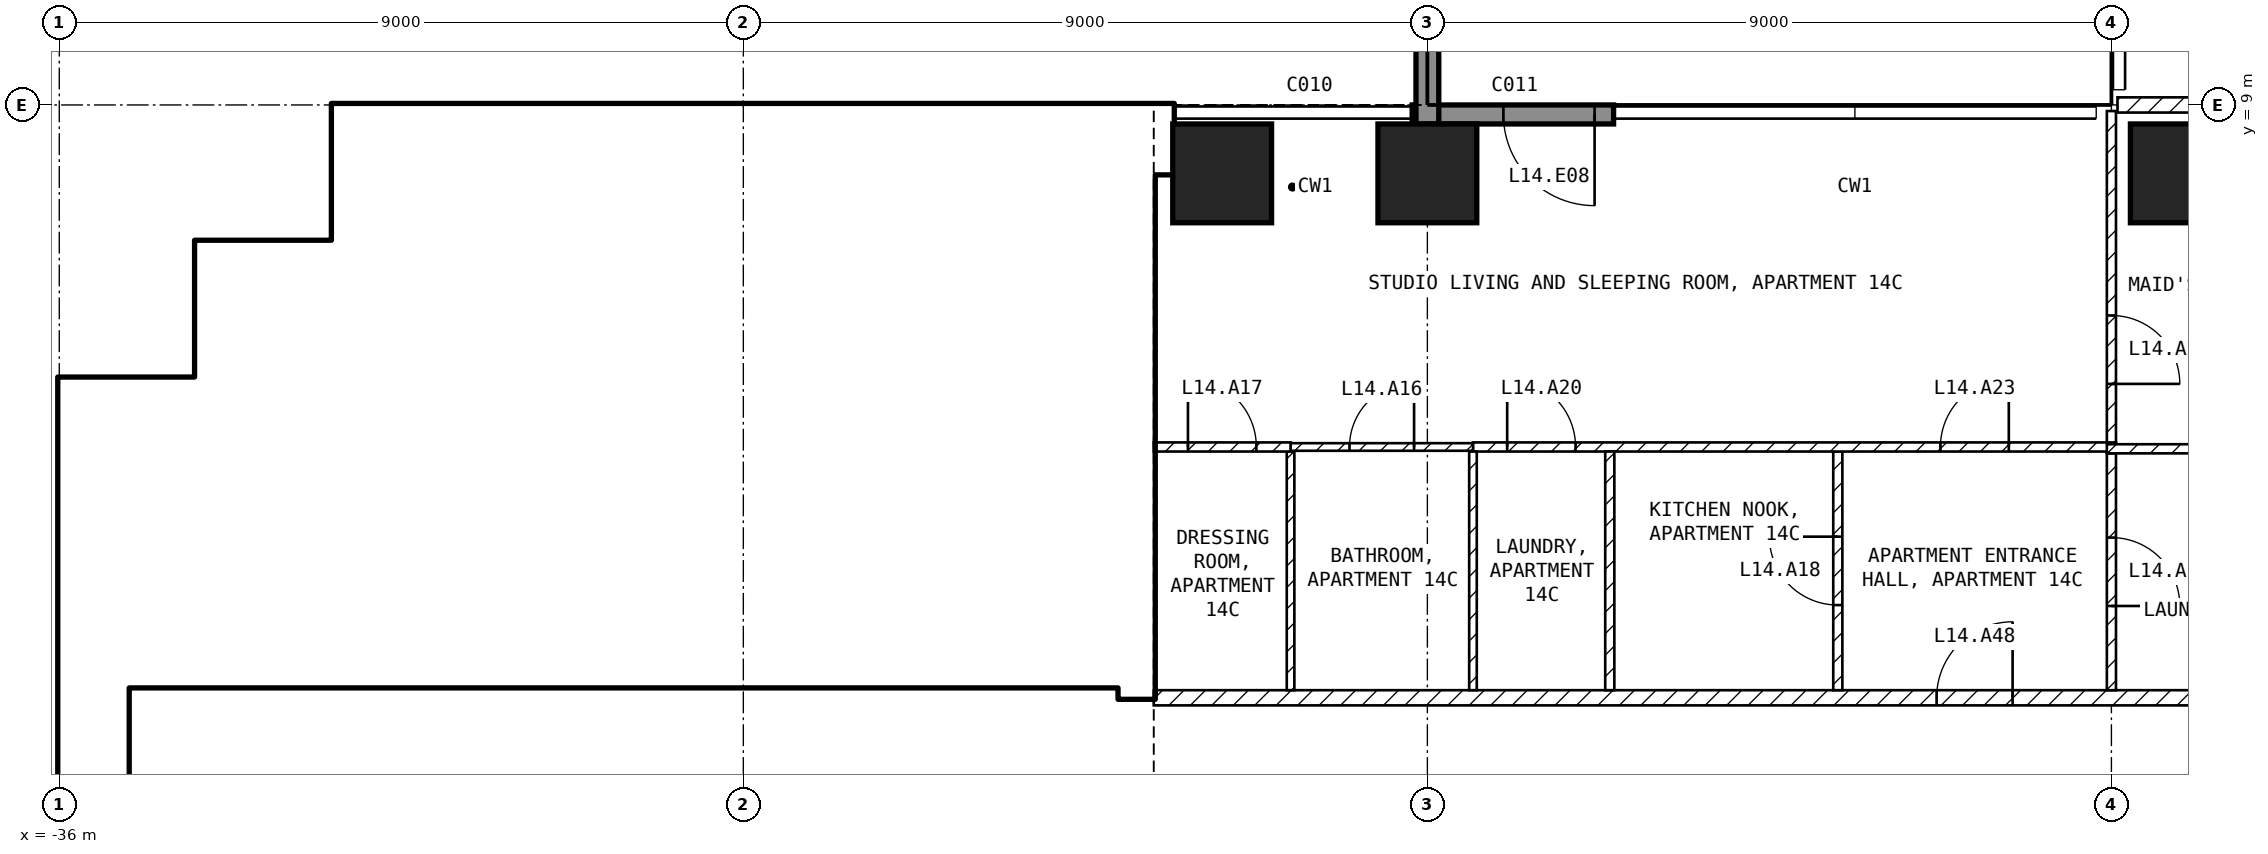
"""IFC4 building model, lengths in metres.
Left out: names, types, materials, properties, quantities, classifications, styles, units other than length and angle.
Written with IfcOpenShell. Run it as: python <this file> out.ifc"""

import sys

from ifc_helpers import new_model, si_unit, direction, frame, frame_2d, origin, origin_2d, place, context, subcontext, project, spatial, rectangle, extrude, element, fill, save


model = new_model("IFC4")
c1 = context("Model", 3, precision=1e-05, world=origin(), true_north=direction((0.0, 1.0)))
c2 = subcontext(c1, "Body", "Model", "MODEL_VIEW")
j1 = project(units=[si_unit("LENGTHUNIT", "METRE"), si_unit("PLANEANGLEUNIT", "RADIAN")], contexts=[c1])
p1 = place(None, origin())
s1 = spatial("IfcSite", under=j1, at=p1, CompositionType="ELEMENT")
p2 = place(p1, origin())
s2 = spatial("IfcBuilding", under=s1, at=p2, CompositionType="ELEMENT")
p3 = place(p2, frame((0.0, 0.0, 68.0)))
s3 = spatial("IfcBuildingStorey", under=s2, at=p3, CompositionType="ELEMENT", Elevation=68.0)
for number, where, z_axis, x_axis in (
    (1, (-20.7, 8.1, -0.25), (0.0, 0.0, 1.0), (1.0, 0.0, 0.0)),
    (2, (-18.0, 8.1, -0.25), (0.0, 0.0, 1.0), (1.0, 0.0, 0.0)),
    (3, (-8.1, 8.1, -0.25), (0.0, 0.0, 1.0), (1.0, 0.0, 0.0)),
):
    element("IfcColumn", number, at=place(p3, frame(where, z_axis=z_axis, x_axis=x_axis)), inside=s3, PredefinedType="COLUMN", context=c2, shape_type="SweptSolid", body=[
        extrude(rectangle(XDim=1.3, YDim=1.3, at=origin_2d()), origin(), (0.0, 0.0, 1.0), 3.5),
    ])
p4 = place(p3, frame((-15.55, 8.875, 0.0), z_axis=(0.0, 0.0, 1.0), x_axis=(-1.0, 0.0, 0.0)))
e4 = element("IfcWall", 4, at=p4, inside=s3, PredefinedType="SOLIDWALL", context=c2, shape_type="SweptSolid", body=[
    extrude(rectangle(XDim=2.65, YDim=0.25, at=frame_2d((1.325, 0.0))), origin(), (0.0, 0.0, 1.0), 3.25),
])
p5 = place(p4, frame((0.25, 0.0, 0.0)))
e5 = element("IfcOpeningElement", 5, at=p5, cuts=e4, PredefinedType="OPENING", context=c2, shape_type="SweptSolid", body=[
    extrude(rectangle(XDim=1.2, YDim=2.4, at=frame_2d((0.6, 1.2))), frame((0.0, 0.135, 0.0), z_axis=(0.0, -1.0, 0.0), x_axis=(1.0, 0.0, 0.0)), (0.0, 0.0, 1.0), 0.27),
])
p6 = place(p3, frame((-18.0, 8.75, 0.0), z_axis=(0.0, 0.0, 1.0), x_axis=(0.0, 1.0, 0.0)))
e6 = element("IfcWall", 6, at=p6, inside=s3, PredefinedType="SOLIDWALL", context=c2, shape_type="SweptSolid", body=[
    extrude(rectangle(XDim=2.95, YDim=0.3, at=frame_2d((1.475, 0.0))), origin(), (0.0, 0.0, 1.0), 3.25),
])
p7 = place(p3, frame((-35.55, -4.5, 0.0), z_axis=(0.0, 0.0, 1.0), x_axis=(0.0, 1.0, 0.0)))
e7 = element("IfcWall", 7, at=p7, inside=s3, PredefinedType="SHEAR", context=c2, shape_type="SweptSolid", body=[
    extrude(rectangle(XDim=9.9, YDim=0.9, at=frame_2d((4.95, 0.0))), origin(), (0.0, 0.0, 1.0), 3.25),
])
for number, where, z_axis, x_axis in (
    (8, (-35.1, 4.95, 0.0), (0.0, 0.0, 1.0), (1.0, 0.0, 0.0)),
    (9, (-33.75, 5.4, 0.0), (0.0, 0.0, 1.0), (0.0, 1.0, 0.0)),
    (10, (-33.3, 6.75, 0.0), (0.0, 0.0, 1.0), (1.0, 0.0, 0.0)),
    (11, (-31.95, 7.2, 0.0), (0.0, 0.0, 1.0), (0.0, 1.0, 0.0)),
):
    element("IfcWall", number, at=place(p3, frame(where, z_axis=z_axis, x_axis=x_axis)), inside=s3, PredefinedType="SHEAR", context=c2, shape_type="SweptSolid", body=[
        extrude(rectangle(XDim=1.8, YDim=0.9, at=frame_2d((0.9, 0.0))), origin(), (0.0, 0.0, 1.0), 3.25),
    ])
p8 = place(p3, frame((-31.5, 8.55, 0.0), z_axis=(0.0, 0.0, 1.0), x_axis=(1.0, 0.0, 0.0)))
e12 = element("IfcWall", 12, at=p8, inside=s3, PredefinedType="SHEAR", context=c2, shape_type="SweptSolid", body=[
    extrude(rectangle(XDim=10.15, YDim=0.9, at=frame_2d((5.075, 0.0))), origin(), (0.0, 0.0, 1.0), 3.25),
])
p9 = place(p3, frame((-21.825, 1.2, 0.0), z_axis=(0.0, 0.0, 1.0), x_axis=(0.0, 1.0, 0.0)))
e13 = element("IfcWall", 13, at=p9, inside=s3, PredefinedType="SHEAR", context=c2, shape_type="SweptSolid", body=[
    extrude(rectangle(XDim=6.9, YDim=0.45, at=frame_2d((3.45, 0.0))), origin(), (0.0, 0.0, 1.0), 3.25),
])
p10 = place(p3, frame((-35.1, 1.45, 0.0), z_axis=(0.0, 0.0, 1.0), x_axis=(1.0, 0.0, 0.0)))
e14 = element("IfcWall", 14, at=p10, inside=s3, PredefinedType="SOLIDWALL", context=c2, shape_type="SweptSolid", body=[
    extrude(rectangle(XDim=13.05, YDim=0.2, at=frame_2d((6.525, 0.0))), origin(), (0.0, 0.0, 1.0), 3.25),
])
p11 = place(p10, frame((11.3, 0.0, 0.0)))
e15 = element("IfcOpeningElement", 15, at=p11, cuts=e14, PredefinedType="OPENING", context=c2, shape_type="SweptSolid", body=[
    extrude(rectangle(XDim=1.0, YDim=2.1, at=frame_2d((0.5, 1.05))), frame((0.0, 0.11, 0.0), z_axis=(0.0, -1.0, 0.0), x_axis=(1.0, 0.0, 0.0)), (0.0, 0.0, 1.0), 0.22),
])
p12 = place(p10, frame((8.8, 0.0, 0.0)))
e16 = element("IfcOpeningElement", 16, at=p12, cuts=e14, PredefinedType="OPENING", context=c2, shape_type="SweptSolid", body=[
    extrude(rectangle(XDim=1.0, YDim=2.1, at=frame_2d((0.5, 1.05))), frame((0.0, 0.11, 0.0), z_axis=(0.0, -1.0, 0.0), x_axis=(1.0, 0.0, 0.0)), (0.0, 0.0, 1.0), 0.22),
])
p13 = place(p3, frame((-28.35, 5.15, 0.0), z_axis=(0.0, 0.0, 1.0), x_axis=(1.0, 0.0, 0.0)))
e17 = element("IfcWall", 17, at=p13, inside=s3, PredefinedType="SOLIDWALL", context=c2, shape_type="SweptSolid", body=[
    extrude(rectangle(XDim=6.3, YDim=0.2, at=frame_2d((3.15, 0.0))), origin(), (0.0, 0.0, 1.0), 3.25),
])
p14 = place(p13, frame((5.1, 0.0, 0.0)))
e18 = element("IfcOpeningElement", 18, at=p14, cuts=e17, PredefinedType="OPENING", context=c2, shape_type="SweptSolid", body=[
    extrude(rectangle(XDim=1.0, YDim=2.1, at=frame_2d((0.5, 1.05))), frame((0.0, 0.11, 0.0), z_axis=(0.0, -1.0, 0.0), x_axis=(1.0, 0.0, 0.0)), (0.0, 0.0, 1.0), 0.22),
])
p15 = place(p3, frame((-28.25, 5.25, 0.0), z_axis=(0.0, 0.0, 1.0), x_axis=(0.0, 1.0, 0.0)))
e19 = element("IfcWall", 19, at=p15, inside=s3, PredefinedType="SOLIDWALL", context=c2, shape_type="SweptSolid", body=[
    extrude(rectangle(XDim=2.85, YDim=0.2, at=frame_2d((1.425, 0.0))), origin(), (0.0, 0.0, 1.0), 3.25),
])
p16 = place(p3, frame((-35.1, 3.95, 0.0), z_axis=(0.0, 0.0, 1.0), x_axis=(1.0, 0.0, 0.0)))
e20 = element("IfcWall", 20, at=p16, inside=s3, PredefinedType="SOLIDWALL", context=c2, shape_type="SweptSolid", body=[
    extrude(rectangle(XDim=7.9, YDim=0.2, at=frame_2d((3.95, 0.0))), origin(), (0.0, 0.0, 1.0), 3.25),
])
p17 = place(p3, frame((-27.1, 1.55, 0.0), z_axis=(0.0, 0.0, 1.0), x_axis=(0.0, 1.0, 0.0)))
e21 = element("IfcWall", 21, at=p17, inside=s3, PredefinedType="SOLIDWALL", context=c2, shape_type="SweptSolid", body=[
    extrude(rectangle(XDim=3.5, YDim=0.2, at=frame_2d((1.75, 0.0))), origin(), (0.0, 0.0, 1.0), 3.25),
])
p18 = place(p17, frame((0.6, 0.0, 0.0)))
e22 = element("IfcOpeningElement", 22, at=p18, cuts=e21, PredefinedType="OPENING", context=c2, shape_type="SweptSolid", body=[
    extrude(rectangle(XDim=1.1, YDim=2.1, at=frame_2d((0.55, 1.05))), frame((0.0, 0.11, 0.0), z_axis=(0.0, -1.0, 0.0), x_axis=(1.0, 0.0, 0.0)), (0.0, 0.0, 1.0), 0.22),
])
p19 = place(p17, frame((2.6, 0.0, 0.0)))
e23 = element("IfcOpeningElement", 23, at=p19, cuts=e21, PredefinedType="OPENING", context=c2, shape_type="SweptSolid", body=[
    extrude(rectangle(XDim=0.8, YDim=2.1, at=frame_2d((0.4, 1.05))), frame((0.0, 0.11, 0.0), z_axis=(0.0, -1.0, 0.0), x_axis=(1.0, 0.0, 0.0)), (0.0, 0.0, 1.0), 0.22),
])
for number, where, z_axis, x_axis in (
    (24, (-30.0, 1.55, 0.0), (0.0, 0.0, 1.0), (0.0, 1.0, 0.0)),
    (25, (-32.3, 1.55, 0.0), (0.0, 0.0, 1.0), (0.0, 1.0, 0.0)),
    (26, (-35.0, 1.55, 0.0), (0.0, 0.0, 1.0), (0.0, 1.0, 0.0)),
):
    element("IfcWall", number, at=place(p3, frame(where, z_axis=z_axis, x_axis=x_axis)), inside=s3, PredefinedType="SOLIDWALL", context=c2, shape_type="SweptSolid", body=[
        extrude(rectangle(XDim=2.3, YDim=0.2, at=frame_2d((1.15, 0.0))), origin(), (0.0, 0.0, 1.0), 3.25),
    ])
p20 = place(p3, frame((-21.6, 1.2, 0.0), z_axis=(0.0, 0.0, 1.0), x_axis=(1.0, 0.0, 0.0)))
e27 = element("IfcWall", 27, at=p20, inside=s3, PredefinedType="PARTITIONING", context=c2, shape_type="SweptSolid", body=[
    extrude(rectangle(XDim=20.5, YDim=0.2, at=frame_2d((10.25, 0.0))), origin(), (0.0, 0.0, 1.0), 3.25),
])
p21 = place(p20, frame((10.3, 0.0, 0.0)))
e28 = element("IfcOpeningElement", 28, at=p21, cuts=e27, PredefinedType="OPENING", context=c2, shape_type="SweptSolid", body=[
    extrude(rectangle(XDim=1.0, YDim=2.1, at=frame_2d((0.5, 1.05))), frame((0.0, 0.11, 0.0), z_axis=(0.0, -1.0, 0.0), x_axis=(1.0, 0.0, 0.0)), (0.0, 0.0, 1.0), 0.22),
])
p22 = place(p3, frame((-8.92, 9.0, 0.0), z_axis=(0.0, 0.0, 1.0), x_axis=(1.0, 0.0, 0.0)))
e29 = element("IfcWall", 29, at=p22, inside=s3, PredefinedType="PARTITIONING", context=c2, shape_type="SweptSolid", body=[
    extrude(rectangle(XDim=17.84, YDim=0.2, at=frame_2d((8.92, 0.0))), origin(), (0.0, 0.0, 1.0), 3.25),
])
p23 = place(p22, frame((8.42, 0.0, 0.0)))
e30 = element("IfcOpeningElement", 30, at=p23, cuts=e29, PredefinedType="OPENING", context=c2, shape_type="SweptSolid", body=[
    extrude(rectangle(XDim=1.0, YDim=2.1, at=frame_2d((0.5, 1.05))), frame((0.0, 0.11, 0.0), z_axis=(0.0, -1.0, 0.0), x_axis=(1.0, 0.0, 0.0)), (0.0, 0.0, 1.0), 0.22),
])
p24 = place(p3, frame((-12.6, 1.3, 0.0), z_axis=(0.0, 0.0, 1.0), x_axis=(0.0, 1.0, 0.0)))
e31 = element("IfcWall", 31, at=p24, inside=s3, PredefinedType="PARTITIONING", context=c2, shape_type="SweptSolid", body=[
    extrude(rectangle(XDim=3.14, YDim=0.12, at=frame_2d((1.57, 0.0))), origin(), (0.0, 0.0, 1.0), 3.25),
])
p25 = place(p24, frame((1.12, 0.0, 0.0)))
e32 = element("IfcOpeningElement", 32, at=p25, cuts=e31, PredefinedType="OPENING", context=c2, shape_type="SweptSolid", body=[
    extrude(rectangle(XDim=0.9, YDim=2.1, at=frame_2d((0.45, 1.05))), frame((0.0, 0.07, 0.0), z_axis=(0.0, -1.0, 0.0), x_axis=(1.0, 0.0, 0.0)), (0.0, 0.0, 1.0), 0.14),
])
p26 = place(p3, frame((-17.4, 4.5, 0.0), z_axis=(0.0, 0.0, 1.0), x_axis=(1.0, 0.0, 0.0)))
e33 = element("IfcWall", 33, at=p26, inside=s3, PredefinedType="PARTITIONING", context=c2, shape_type="SweptSolid", body=[
    extrude(rectangle(XDim=8.46, YDim=0.12, at=frame_2d((4.23, 0.0))), origin(), (0.0, 0.0, 1.0), 3.25),
])
p27 = place(p26, frame((0.45, 0.0, 0.0)))
e34 = element("IfcOpeningElement", 34, at=p27, cuts=e33, PredefinedType="OPENING", context=c2, shape_type="SweptSolid", body=[
    extrude(rectangle(XDim=0.9, YDim=2.1, at=frame_2d((0.45, 1.05))), frame((0.0, 0.07, 0.0), z_axis=(0.0, -1.0, 0.0), x_axis=(1.0, 0.0, 0.0)), (0.0, 0.0, 1.0), 0.14),
])
p28 = place(p26, frame((6.15, 0.0, 0.0)))
e35 = element("IfcOpeningElement", 35, at=p28, cuts=e33, PredefinedType="OPENING", context=c2, shape_type="SweptSolid", body=[
    extrude(rectangle(XDim=0.9, YDim=2.1, at=frame_2d((0.45, 1.05))), frame((0.0, 0.07, 0.0), z_axis=(0.0, -1.0, 0.0), x_axis=(1.0, 0.0, 0.0)), (0.0, 0.0, 1.0), 0.14),
])
p29 = place(p3, frame((-9.0, 4.416, 0.0), z_axis=(0.0, 0.0, 1.0), x_axis=(0.0, -1.0, 0.0)))
e36 = element("IfcWall", 36, at=p29, inside=s3, PredefinedType="PARTITIONING", context=c2, shape_type="SweptSolid", body=[
    extrude(rectangle(XDim=3.116, YDim=0.12, at=frame_2d((1.558, 0.0))), origin(), (0.0, 0.0, 1.0), 3.25),
])
p30 = place(p29, frame((1.108, 0.0, 0.0)))
e37 = element("IfcOpeningElement", 37, at=p30, cuts=e36, PredefinedType="OPENING", context=c2, shape_type="SweptSolid", body=[
    extrude(rectangle(XDim=0.9, YDim=2.1, at=frame_2d((0.45, 1.05))), frame((0.0, 0.07, 0.0), z_axis=(0.0, -1.0, 0.0), x_axis=(1.0, 0.0, 0.0)), (0.0, 0.0, 1.0), 0.14),
])
p31 = place(p3, frame((-15.6, 1.3, 0.0), z_axis=(0.0, 0.0, 1.0), x_axis=(0.0, 1.0, 0.0)))
e38 = element("IfcWall", 38, at=p31, inside=s3, PredefinedType="PARTITIONING", context=c2, shape_type="SweptSolid", body=[
    extrude(rectangle(XDim=3.14, YDim=0.12, at=frame_2d((1.57, 0.0))), origin(), (0.0, 0.0, 1.0), 3.25),
])
for number, where, z_axis, x_axis in (
    (39, (-17.4, 1.3, 0.0), (0.0, 0.0, 1.0), (0.0, 1.0, 0.0)),
    (40, (-19.8, 1.3, 0.0), (0.0, 0.0, 1.0), (0.0, 1.0, 0.0)),
):
    element("IfcWall", number, at=place(p3, frame(where, z_axis=z_axis, x_axis=x_axis)), inside=s3, PredefinedType="PARTITIONING", context=c2, shape_type="SweptSolid", body=[
        extrude(rectangle(XDim=3.14, YDim=0.1, at=frame_2d((1.57, 0.0))), origin(), (0.0, 0.0, 1.0), 3.25),
    ])
p32 = place(p3, frame((-19.8, 4.5, 0.0), z_axis=(0.0, 0.0, 1.0), x_axis=(1.0, 0.0, 0.0)))
e41 = element("IfcWall", 41, at=p32, inside=s3, PredefinedType="PARTITIONING", context=c2, shape_type="SweptSolid", body=[
    extrude(rectangle(XDim=2.4, YDim=0.1, at=frame_2d((1.2, 0.0))), origin(), (0.0, 0.0, 1.0), 3.25),
])
p33 = place(p32, frame((0.775, 0.0, 0.0)))
e42 = element("IfcOpeningElement", 42, at=p33, cuts=e41, PredefinedType="OPENING", context=c2, shape_type="SweptSolid", body=[
    extrude(rectangle(XDim=0.85, YDim=2.1, at=frame_2d((0.425, 1.05))), frame((0.0, 0.06, 0.0), z_axis=(0.0, -1.0, 0.0), x_axis=(1.0, 0.0, 0.0)), (0.0, 0.0, 1.0), 0.12),
])
p34 = place(p3, frame((-21.6, 4.5, 0.0), z_axis=(0.0, 0.0, 1.0), x_axis=(1.0, 0.0, 0.0)))
e43 = element("IfcWall", 43, at=p34, inside=s3, PredefinedType="PARTITIONING", context=c2, shape_type="SweptSolid", body=[
    extrude(rectangle(XDim=1.8, YDim=0.12, at=frame_2d((0.9, 0.0))), origin(), (0.0, 0.0, 1.0), 3.25),
])
p35 = place(p34, frame((0.45, 0.0, 0.0)))
e44 = element("IfcOpeningElement", 44, at=p35, cuts=e43, PredefinedType="OPENING", context=c2, shape_type="SweptSolid", body=[
    extrude(rectangle(XDim=0.9, YDim=2.1, at=frame_2d((0.45, 1.05))), frame((0.0, 0.07, 0.0), z_axis=(0.0, -1.0, 0.0), x_axis=(1.0, 0.0, 0.0)), (0.0, 0.0, 1.0), 0.14),
])
p36 = place(p3, frame((-9.0, 8.92, 0.0), z_axis=(0.0, 0.0, 1.0), x_axis=(0.0, -1.0, 0.0)))
e45 = element("IfcWall", 45, at=p36, inside=s3, PredefinedType="PARTITIONING", context=c2, shape_type="SweptSolid", body=[
    extrude(rectangle(XDim=4.36, YDim=0.12, at=frame_2d((2.18, 0.0))), origin(), (0.0, 0.0, 1.0), 3.25),
])
p37 = place(p36, frame((2.69, 0.0, 0.0)))
e46 = element("IfcOpeningElement", 46, at=p37, cuts=e45, PredefinedType="OPENING", context=c2, shape_type="SweptSolid", body=[
    extrude(rectangle(XDim=0.9, YDim=2.1, at=frame_2d((0.45, 1.05))), frame((0.0, 0.07, 0.0), z_axis=(0.0, -1.0, 0.0), x_axis=(1.0, 0.0, 0.0)), (0.0, 0.0, 1.0), 0.14),
])
p38 = place(p3, frame((-9.06, 4.476, 0.0), z_axis=(0.0, 0.0, 1.0), x_axis=(1.0, 0.0, 0.0)))
e47 = element("IfcWall", 47, at=p38, inside=s3, PredefinedType="PARTITIONING", context=c2, shape_type="SweptSolid", body=[
    extrude(rectangle(XDim=4.62, YDim=0.12, at=frame_2d((2.31, 0.0))), origin(), (0.0, 0.0, 1.0), 3.25),
])
p39 = place(p5, origin())
e48 = element("IfcDoor", 48, at=p39, inside=s3, OperationType="SINGLE_SWING_LEFT", PredefinedType="DOOR", context=c2, shape_type="SweptSolid", body=[
    extrude(rectangle(XDim=1.2, YDim=2.4, at=frame_2d((0.6, 1.2))), frame((0.0, 0.025, 0.0), z_axis=(0.0, -1.0, 0.0), x_axis=(1.0, 0.0, 0.0)), (0.0, 0.0, 1.0), 0.05),
])
fill(e5, e48)
p40 = place(p18, origin())
e49 = element("IfcDoor", 49, at=p40, inside=s3, OperationType="DOUBLE_DOOR_SLIDING", PredefinedType="DOOR", context=c2, shape_type="SweptSolid", body=[
    extrude(rectangle(XDim=1.1, YDim=2.1, at=frame_2d((0.55, 1.05))), frame((0.0, 0.025, 0.0), z_axis=(0.0, -1.0, 0.0), x_axis=(1.0, 0.0, 0.0)), (0.0, 0.0, 1.0), 0.05),
])
fill(e22, e49)
p41 = place(p14, origin())
e50 = element("IfcDoor", 50, at=p41, inside=s3, OperationType="SINGLE_SWING_LEFT", PredefinedType="DOOR", context=c2, shape_type="SweptSolid", body=[
    extrude(rectangle(XDim=1.0, YDim=2.1, at=frame_2d((0.5, 1.05))), frame((0.0, 0.025, 0.0), z_axis=(0.0, -1.0, 0.0), x_axis=(1.0, 0.0, 0.0)), (0.0, 0.0, 1.0), 0.05),
])
fill(e18, e50)
p42 = place(p11, origin())
e51 = element("IfcDoor", 51, at=p42, inside=s3, OperationType="SINGLE_SWING_LEFT", PredefinedType="DOOR", context=c2, shape_type="SweptSolid", body=[
    extrude(rectangle(XDim=1.0, YDim=2.1, at=frame_2d((0.5, 1.05))), frame((0.0, 0.025, 0.0), z_axis=(0.0, -1.0, 0.0), x_axis=(1.0, 0.0, 0.0)), (0.0, 0.0, 1.0), 0.05),
])
fill(e15, e51)
p43 = place(p12, origin())
e52 = element("IfcDoor", 52, at=p43, inside=s3, OperationType="SINGLE_SWING_LEFT", PredefinedType="DOOR", context=c2, shape_type="SweptSolid", body=[
    extrude(rectangle(XDim=1.0, YDim=2.1, at=frame_2d((0.5, 1.05))), frame((0.0, 0.025, 0.0), z_axis=(0.0, -1.0, 0.0), x_axis=(1.0, 0.0, 0.0)), (0.0, 0.0, 1.0), 0.05),
])
fill(e16, e52)
p44 = place(p19, origin())
e53 = element("IfcDoor", 53, at=p44, inside=s3, OperationType="SINGLE_SWING_LEFT", PredefinedType="DOOR", context=c2, shape_type="SweptSolid", body=[
    extrude(rectangle(XDim=0.8, YDim=2.1, at=frame_2d((0.4, 1.05))), frame((0.0, 0.025, 0.0), z_axis=(0.0, -1.0, 0.0), x_axis=(1.0, 0.0, 0.0)), (0.0, 0.0, 1.0), 0.05),
])
fill(e23, e53)
p45 = place(p33, origin())
e54 = element("IfcDoor", 54, at=p45, inside=s3, OperationType="SINGLE_SWING_RIGHT", PredefinedType="DOOR", context=c2, shape_type="SweptSolid", body=[
    extrude(rectangle(XDim=0.85, YDim=2.1, at=frame_2d((0.425, 1.05))), frame((0.0, 0.025, 0.0), z_axis=(0.0, -1.0, 0.0), x_axis=(1.0, 0.0, 0.0)), (0.0, 0.0, 1.0), 0.05),
])
fill(e42, e54)
p46 = place(p35, origin())
e55 = element("IfcDoor", 55, at=p46, inside=s3, OperationType="SINGLE_SWING_LEFT", PredefinedType="DOOR", context=c2, shape_type="SweptSolid", body=[
    extrude(rectangle(XDim=0.9, YDim=2.1, at=frame_2d((0.45, 1.05))), frame((0.0, 0.025, 0.0), z_axis=(0.0, -1.0, 0.0), x_axis=(1.0, 0.0, 0.0)), (0.0, 0.0, 1.0), 0.05),
])
fill(e44, e55)
p47 = place(p25, origin())
e56 = element("IfcDoor", 56, at=p47, inside=s3, OperationType="SINGLE_SWING_RIGHT", PredefinedType="DOOR", context=c2, shape_type="SweptSolid", body=[
    extrude(rectangle(XDim=0.9, YDim=2.1, at=frame_2d((0.45, 1.05))), frame((0.0, 0.025, 0.0), z_axis=(0.0, -1.0, 0.0), x_axis=(1.0, 0.0, 0.0)), (0.0, 0.0, 1.0), 0.05),
])
fill(e32, e56)
p48 = place(p30, origin())
e57 = element("IfcDoor", 57, at=p48, inside=s3, OperationType="SINGLE_SWING_RIGHT", PredefinedType="DOOR", context=c2, shape_type="SweptSolid", body=[
    extrude(rectangle(XDim=0.9, YDim=2.1, at=frame_2d((0.45, 1.05))), frame((0.0, 0.025, 0.0), z_axis=(0.0, -1.0, 0.0), x_axis=(1.0, 0.0, 0.0)), (0.0, 0.0, 1.0), 0.05),
])
fill(e37, e57)
p49 = place(p27, origin())
e58 = element("IfcDoor", 58, at=p49, inside=s3, OperationType="SINGLE_SWING_LEFT", PredefinedType="DOOR", context=c2, shape_type="SweptSolid", body=[
    extrude(rectangle(XDim=0.9, YDim=2.1, at=frame_2d((0.45, 1.05))), frame((0.0, 0.025, 0.0), z_axis=(0.0, -1.0, 0.0), x_axis=(1.0, 0.0, 0.0)), (0.0, 0.0, 1.0), 0.05),
])
fill(e34, e58)
p50 = place(p37, origin())
e59 = element("IfcDoor", 59, at=p50, inside=s3, OperationType="SINGLE_SWING_RIGHT", PredefinedType="DOOR", context=c2, shape_type="SweptSolid", body=[
    extrude(rectangle(XDim=0.9, YDim=2.1, at=frame_2d((0.45, 1.05))), frame((0.0, 0.025, 0.0), z_axis=(0.0, -1.0, 0.0), x_axis=(1.0, 0.0, 0.0)), (0.0, 0.0, 1.0), 0.05),
])
fill(e46, e59)
p51 = place(p28, origin())
e60 = element("IfcDoor", 60, at=p51, inside=s3, OperationType="SINGLE_SWING_RIGHT", PredefinedType="DOOR", context=c2, shape_type="SweptSolid", body=[
    extrude(rectangle(XDim=0.9, YDim=2.1, at=frame_2d((0.45, 1.05))), frame((0.0, 0.025, 0.0), z_axis=(0.0, -1.0, 0.0), x_axis=(1.0, 0.0, 0.0)), (0.0, 0.0, 1.0), 0.05),
])
fill(e35, e60)
p52 = place(p21, origin())
e61 = element("IfcDoor", 61, at=p52, inside=s3, OperationType="SINGLE_SWING_RIGHT", PredefinedType="DOOR", context=c2, shape_type="SweptSolid", body=[
    extrude(rectangle(XDim=1.0, YDim=2.1, at=frame_2d((0.5, 1.05))), frame((0.0, 0.025, 0.0), z_axis=(0.0, -1.0, 0.0), x_axis=(1.0, 0.0, 0.0)), (0.0, 0.0, 1.0), 0.05),
])
fill(e28, e61)
save(model, sys.argv[1])
